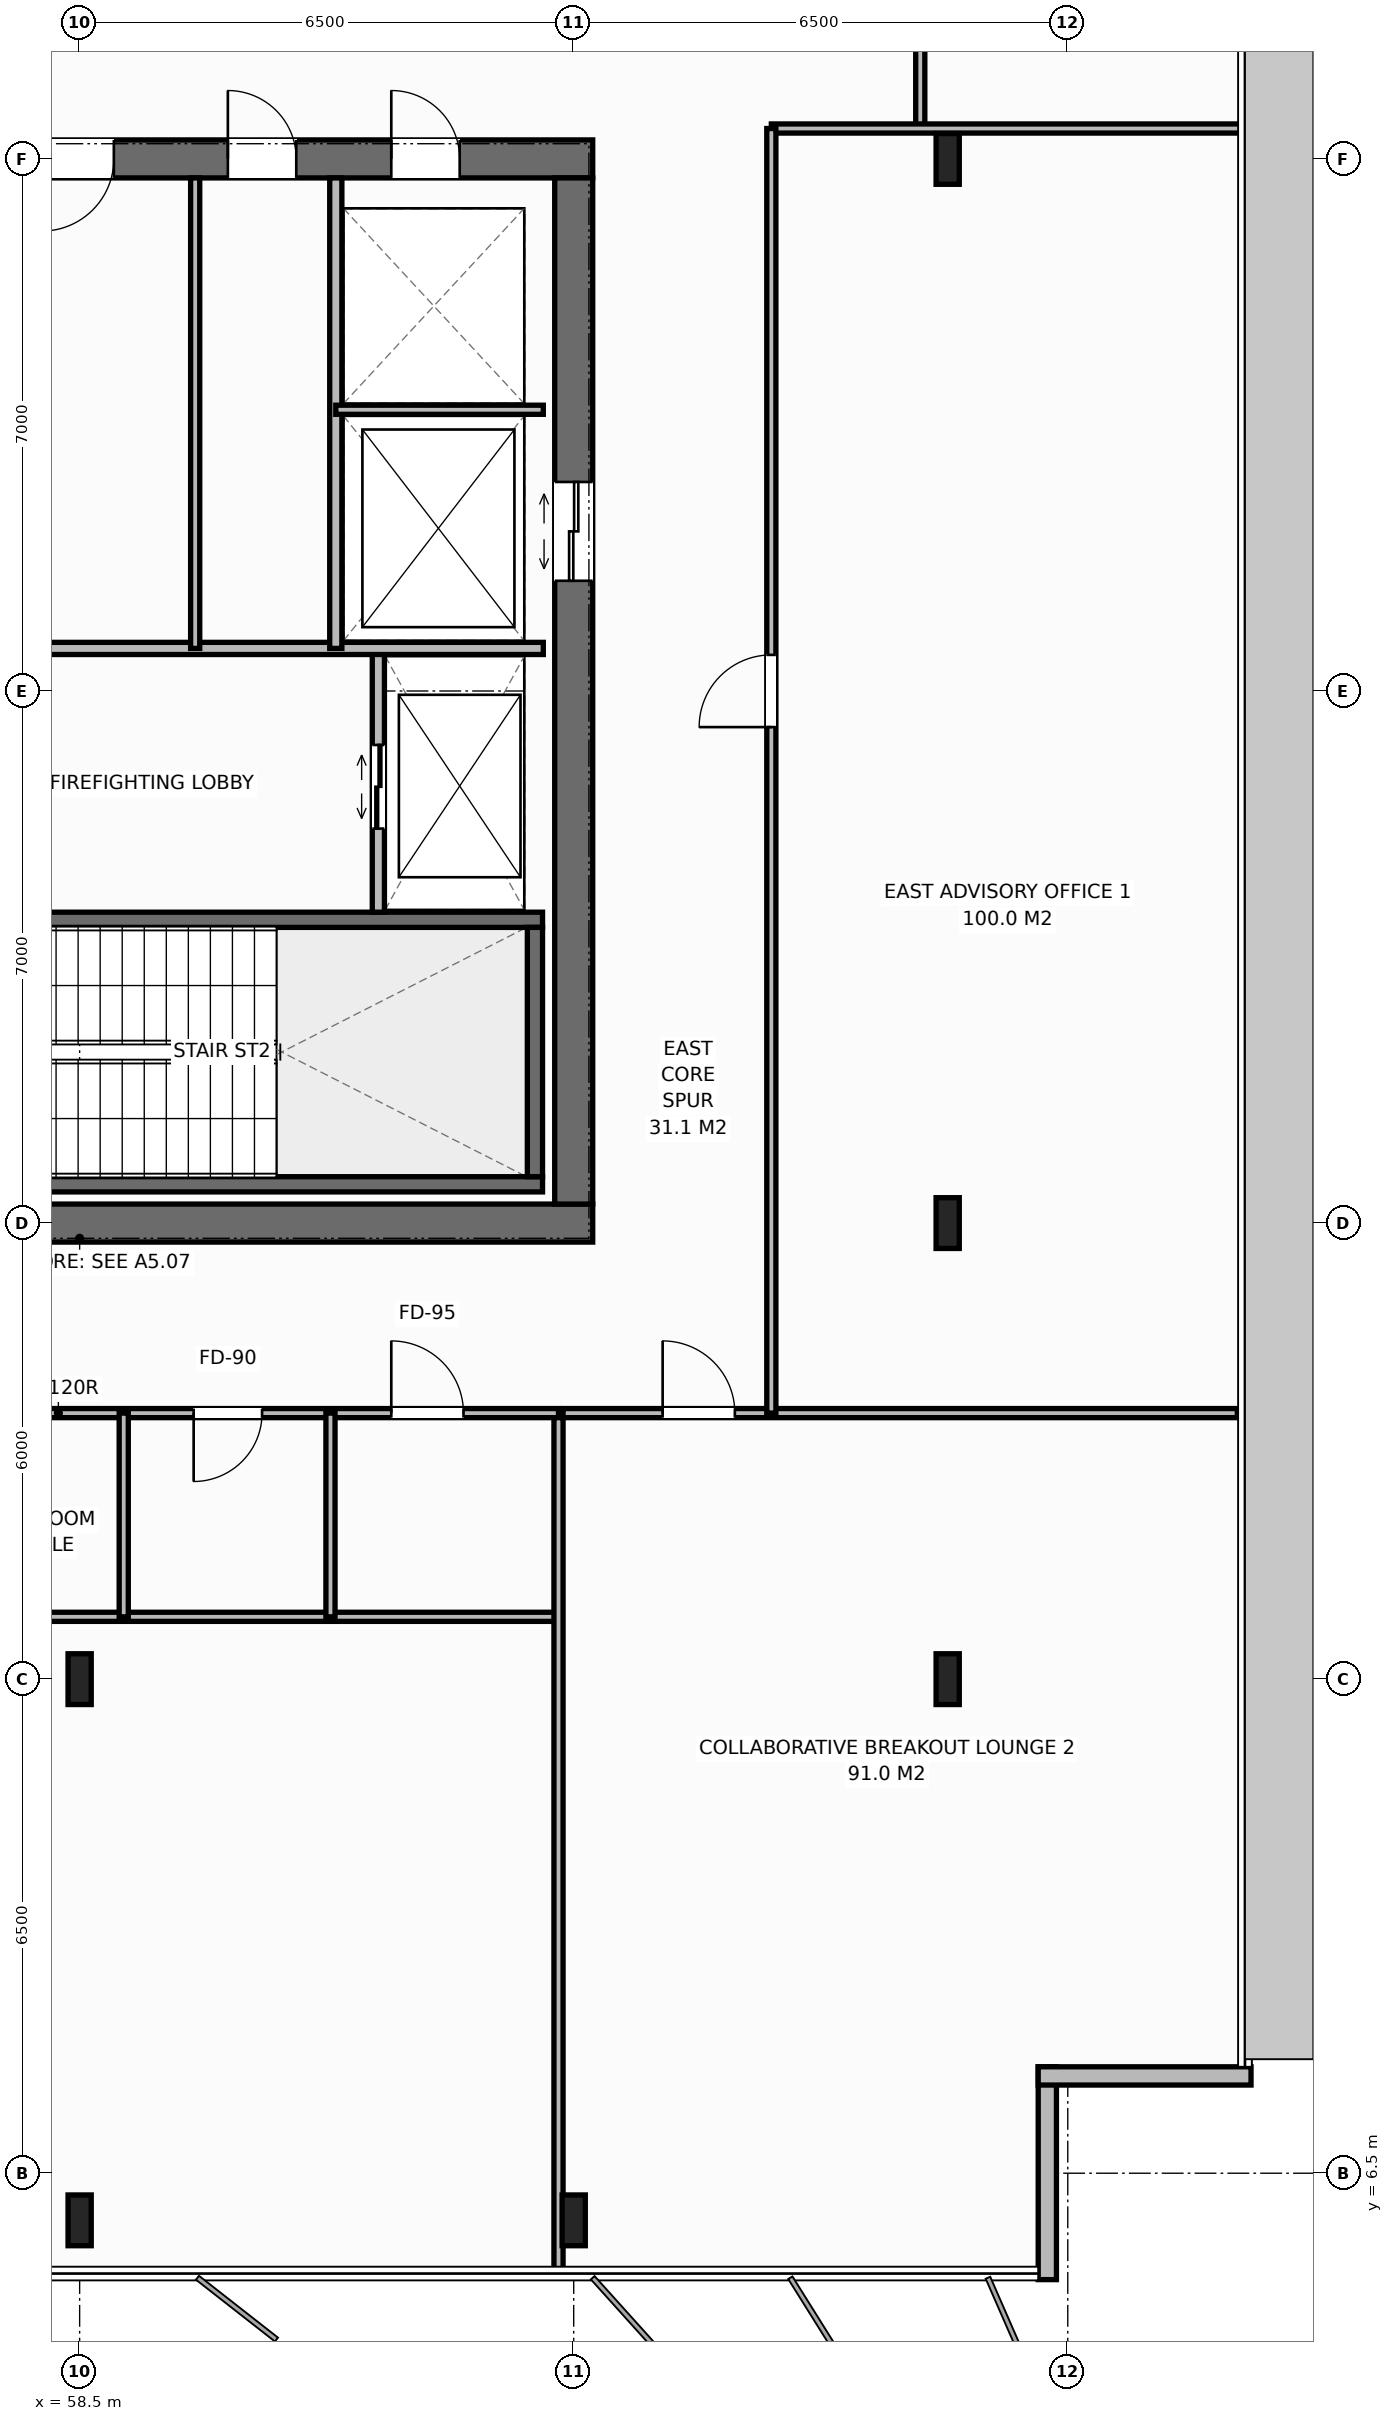
"""IFC4 building model, lengths in metres.
Left out: names, types, materials, properties, quantities, classifications, styles, units other than length and angle.
Written with IfcOpenShell. Run it as: python <this file> out.ifc"""

import sys

from ifc_helpers import new_model, si_unit, direction, frame, frame_2d, origin, origin_2d, place, context, subcontext, project, spatial, rectangle, i_section, extrude, element, fill, save


model = new_model("IFC4")
c1 = context("Model", 3, precision=1e-05, world=origin(), true_north=direction((0.0, 1.0)))
c2 = subcontext(c1, "Body", "Model", "MODEL_VIEW")
j1 = project(units=[si_unit("LENGTHUNIT", "METRE"), si_unit("PLANEANGLEUNIT", "RADIAN")], contexts=[c1])
p1 = place(None, origin())
s1 = spatial("IfcSite", under=j1, at=p1, CompositionType="ELEMENT")
p2 = place(p1, origin())
s2 = spatial("IfcBuilding", under=s1, at=p2, CompositionType="ELEMENT")
p3 = place(p2, frame((0.0, 0.0, 298.4)))
s3 = spatial("IfcBuildingStorey", under=s2, at=p3, CompositionType="ELEMENT", Elevation=298.4)
p4 = place(p3, frame((51.75, 19.0, 0.0), z_axis=(0.0, 0.0, 1.0), x_axis=(1.0, 0.0, 0.0)))
e1 = element("IfcWall", 1, at=p4, inside=s3, PredefinedType="SHEAR", context=c2, shape_type="SweptSolid", body=[
    extrude(rectangle(XDim=13.5, YDim=0.5, at=frame_2d((6.75, 0.0))), origin(), (0.0, 0.0, 1.0), 4.0),
])
p5 = place(p4, frame((2.97, 0.0, 0.0)))
e2 = element("IfcOpeningElement", 2, at=p5, cuts=e1, PredefinedType="OPENING", context=c2, shape_type="SweptSolid", body=[
    extrude(rectangle(XDim=1.4, YDim=2.2, at=frame_2d((0.7, 1.1))), frame((0.0, 0.26, 0.0), z_axis=(0.0, -1.0, 0.0), x_axis=(1.0, 0.0, 0.0)), (0.0, 0.0, 1.0), 0.52),
])
p6 = place(p3, frame((51.75, 33.0, 0.0), z_axis=(0.0, 0.0, 1.0), x_axis=(1.0, 0.0, 0.0)))
e3 = element("IfcWall", 3, at=p6, inside=s3, PredefinedType="SHEAR", context=c2, shape_type="SweptSolid", body=[
    extrude(rectangle(XDim=13.5, YDim=0.5, at=frame_2d((6.75, 0.0))), origin(), (0.0, 0.0, 1.0), 4.0),
])
p7 = place(p6, frame((2.97, 0.0, 0.0)))
e4 = element("IfcOpeningElement", 4, at=p7, cuts=e3, PredefinedType="OPENING", context=c2, shape_type="SweptSolid", body=[
    extrude(rectangle(XDim=1.4, YDim=2.2, at=frame_2d((0.7, 1.1))), frame((0.0, 0.26, 0.0), z_axis=(0.0, -1.0, 0.0), x_axis=(1.0, 0.0, 0.0)), (0.0, 0.0, 1.0), 0.52),
])
p8 = place(p6, frame((10.85, 0.0, 0.0)))
e5 = element("IfcOpeningElement", 5, at=p8, cuts=e3, PredefinedType="OPENING", context=c2, shape_type="SweptSolid", body=[
    extrude(rectangle(XDim=0.9, YDim=2.15, at=frame_2d((0.45, 1.075))), frame((0.0, 0.26, 0.0), z_axis=(0.0, -1.0, 0.0), x_axis=(1.0, 0.0, 0.0)), (0.0, 0.0, 1.0), 0.52),
])
p9 = place(p6, frame((6.25, 0.0, 0.0)))
e6 = element("IfcOpeningElement", 6, at=p9, cuts=e3, PredefinedType="OPENING", context=c2, shape_type="SweptSolid", body=[
    extrude(rectangle(XDim=0.95, YDim=2.15, at=frame_2d((0.475, 1.075))), frame((0.0, 0.26, 0.0), z_axis=(0.0, -1.0, 0.0), x_axis=(1.0, 0.0, 0.0)), (0.0, 0.0, 1.0), 0.52),
])
p10 = place(p6, frame((8.7, 0.0, 0.0)))
e7 = element("IfcOpeningElement", 7, at=p10, cuts=e3, PredefinedType="OPENING", context=c2, shape_type="SweptSolid", body=[
    extrude(rectangle(XDim=0.9, YDim=2.15, at=frame_2d((0.45, 1.075))), frame((0.0, 0.26, 0.0), z_axis=(0.0, -1.0, 0.0), x_axis=(1.0, 0.0, 0.0)), (0.0, 0.0, 1.0), 0.52),
])
p11 = place(p3, frame((65.0, 19.25, 0.0), z_axis=(0.0, 0.0, 1.0), x_axis=(0.0, 1.0, 0.0)))
e8 = element("IfcWall", 8, at=p11, inside=s3, PredefinedType="SHEAR", context=c2, shape_type="SweptSolid", body=[
    extrude(rectangle(XDim=13.5, YDim=0.5, at=frame_2d((6.75, 0.0))), origin(), (0.0, 0.0, 1.0), 4.0),
])
p12 = place(p11, frame((8.2, 0.0, 0.0)))
e9 = element("IfcOpeningElement", 9, at=p12, cuts=e8, PredefinedType="OPENING", context=c2, shape_type="SweptSolid", body=[
    extrude(rectangle(XDim=1.3, YDim=2.2, at=frame_2d((0.65, 1.1))), frame((0.0, 0.26, 0.0), z_axis=(0.0, -1.0, 0.0), x_axis=(1.0, 0.0, 0.0)), (0.0, 0.0, 1.0), 0.52),
])
p13 = place(p3, frame((56.16, 19.51, 0.0), z_axis=(0.0, 0.0, 1.0), x_axis=(1.0, 0.0, 0.0)))
e10 = element("IfcWall", 10, at=p13, inside=s3, PredefinedType="SHEAR", context=c2, shape_type="SweptSolid", body=[
    extrude(rectangle(XDim=8.43, YDim=0.2, at=frame_2d((4.215, 0.0))), origin(), (0.0, 0.0, 1.0), 4.0),
])
p14 = place(p3, frame((56.16, 22.99, 0.0), z_axis=(0.0, 0.0, 1.0), x_axis=(1.0, 0.0, 0.0)))
e11 = element("IfcWall", 11, at=p14, inside=s3, PredefinedType="SHEAR", context=c2, shape_type="SweptSolid", body=[
    extrude(rectangle(XDim=8.43, YDim=0.2, at=frame_2d((4.215, 0.0))), origin(), (0.0, 0.0, 1.0), 4.0),
])
p15 = place(p14, frame((0.45, 0.0, 0.0)))
e12 = element("IfcOpeningElement", 12, at=p15, cuts=e11, PredefinedType="OPENING", context=c2, shape_type="SweptSolid", body=[
    extrude(rectangle(XDim=1.0, YDim=2.15, at=frame_2d((0.5, 1.075))), frame((0.0, 0.11, 0.0), z_axis=(0.0, -1.0, 0.0), x_axis=(1.0, 0.0, 0.0)), (0.0, 0.0, 1.0), 0.22),
])
p16 = place(p3, frame((64.49, 19.61, 0.0), z_axis=(0.0, 0.0, 1.0), x_axis=(0.0, 1.0, 0.0)))
e13 = element("IfcWall", 13, at=p16, inside=s3, PredefinedType="SHEAR", context=c2, shape_type="SweptSolid", body=[
    extrude(rectangle(XDim=3.28, YDim=0.2, at=frame_2d((1.64, 0.0))), origin(), (0.0, 0.0, 1.0), 4.0),
])
for number, where, z_axis, x_axis in (
    (14, (58.5, 13.0, 0.0), (0.0, 0.0, 1.0), (1.0, 0.0, 0.0)),
    (15, (58.5, 5.88, 0.0), (0.0, 0.0, 1.0), (1.0, 0.0, 0.0)),
    (16, (65.0, 5.88, 0.0), (0.0, 0.0, 1.0), (1.0, 0.0, 0.0)),
    (17, (69.92, 13.0, 0.0), (0.0, 0.0, 1.0), (1.0, 0.0, 0.0)),
    (18, (69.92, 19.0, 0.0), (0.0, 0.0, 1.0), (1.0, 0.0, 0.0)),
    (19, (69.92, 33.0, 0.0), (0.0, 0.0, 1.0), (1.0, 0.0, 0.0)),
):
    element("IfcColumn", number, at=place(p3, frame(where, z_axis=z_axis, x_axis=x_axis)), inside=s3, PredefinedType="COLUMN", context=c2, shape_type="SweptSolid", body=[
        extrude(i_section(OverallWidth=0.305, OverallDepth=0.668, WebThickness=0.021, FlangeThickness=0.04, at=origin_2d()), origin(), (0.0, 0.0, 1.0), 4.0),
    ])
for number, where, z_axis, x_axis in (
    (20, (71.231, 7.9, 0.0), (0.0, 0.0, 1.0), (0.0, -1.0, 0.0)),
    (21, (73.911, 7.78, 0.0), (0.0, 0.0, 1.0), (-1.0, 0.0, 0.0)),
):
    element("IfcWall", number, at=place(p3, frame(where, z_axis=z_axis, x_axis=x_axis)), inside=s3, PredefinedType="STANDARD", context=c2, shape_type="SweptSolid", body=[
        extrude(rectangle(XDim=2.8, YDim=0.24, at=frame_2d((1.4, 0.0))), origin(), (0.0, 0.0, 1.0), 3.788),
    ])
p17 = place(p3, frame((62.43, 23.09, 0.0), z_axis=(0.0, 0.0, 1.0), x_axis=(0.0, 1.0, 0.0)))
e22 = element("IfcWall", 22, at=p17, inside=s3, PredefinedType="STANDARD", context=c2, shape_type="SweptSolid", body=[
    extrude(rectangle(XDim=3.47, YDim=0.16, at=frame_2d((1.735, 0.0))), origin(), (0.0, 0.0, 1.0), 3.788),
])
p18 = place(p17, frame((1.1, 0.0, 0.0)))
e23 = element("IfcOpeningElement", 23, at=p18, cuts=e22, PredefinedType="OPENING", context=c2, shape_type="SweptSolid", body=[
    extrude(rectangle(XDim=1.1, YDim=2.2, at=frame_2d((0.55, 1.1))), frame((0.0, 0.09, 0.0), z_axis=(0.0, -1.0, 0.0), x_axis=(1.0, 0.0, 0.0)), (0.0, 0.0, 1.0), 0.18),
])
p19 = place(p3, frame((56.26, 26.56, 0.0), z_axis=(0.0, 0.0, 1.0), x_axis=(1.0, 0.0, 0.0)))
e24 = element("IfcWall", 24, at=p19, inside=s3, PredefinedType="STANDARD", context=c2, shape_type="SweptSolid", body=[
    extrude(rectangle(XDim=8.34, YDim=0.16, at=frame_2d((4.17, 0.0))), origin(), (0.0, 0.0, 1.0), 3.788),
])
p20 = place(p3, frame((61.87, 26.56, 0.0), z_axis=(0.0, 0.0, 1.0), x_axis=(0.0, 1.0, 0.0)))
e25 = element("IfcWall", 25, at=p20, inside=s3, PredefinedType="STANDARD", context=c2, shape_type="SweptSolid", body=[
    extrude(rectangle(XDim=6.19, YDim=0.16, at=frame_2d((3.095, 0.0))), origin(), (0.0, 0.0, 1.0), 3.788),
])
p21 = place(p3, frame((61.87, 29.7, 0.0), z_axis=(0.0, 0.0, 1.0), x_axis=(1.0, 0.0, 0.0)))
e26 = element("IfcWall", 26, at=p21, inside=s3, PredefinedType="PARTITIONING", context=c2, shape_type="SweptSolid", body=[
    extrude(rectangle(XDim=2.73, YDim=0.12, at=frame_2d((1.365, 0.0))), origin(), (0.0, 0.0, 1.0), 3.788),
])
p22 = place(p3, frame((60.02, 26.56, 0.0), z_axis=(0.0, 0.0, 1.0), x_axis=(0.0, 1.0, 0.0)))
e27 = element("IfcWall", 27, at=p22, inside=s3, PredefinedType="PARTITIONING", context=c2, shape_type="SweptSolid", body=[
    extrude(rectangle(XDim=6.19, YDim=0.12, at=frame_2d((3.095, 0.0))), origin(), (0.0, 0.0, 1.0), 3.788),
])
p23 = place(p3, frame((69.559, 33.4, 0.0), z_axis=(0.0, 0.0, 1.0), x_axis=(0.0, 1.0, 0.0)))
e28 = element("IfcWall", 28, at=p23, inside=s3, PredefinedType="PARTITIONING", context=c2, shape_type="SweptSolid", body=[
    extrude(rectangle(XDim=2.1, YDim=0.12, at=frame_2d((1.05, 0.0))), origin(), (0.0, 0.0, 1.0), 3.788),
])
p24 = place(p3, frame((51.64, 16.5, 0.0), z_axis=(0.0, 0.0, 1.0), x_axis=(1.0, 0.0, 0.0)))
e29 = element("IfcWall", 29, at=p24, inside=s3, PredefinedType="PARTITIONING", context=c2, shape_type="SweptSolid", body=[
    extrude(rectangle(XDim=13.16, YDim=0.12, at=frame_2d((6.58, 0.0))), origin(), (0.0, 0.0, 1.0), 3.788),
])
p25 = place(p24, frame((1.51, 0.0, 0.0)))
e30 = element("IfcOpeningElement", 30, at=p25, cuts=e29, PredefinedType="OPENING", context=c2, shape_type="SweptSolid", body=[
    extrude(rectangle(XDim=0.9, YDim=2.15, at=frame_2d((0.45, 1.075))), frame((0.0, 0.07, 0.0), z_axis=(0.0, -1.0, 0.0), x_axis=(1.0, 0.0, 0.0)), (0.0, 0.0, 1.0), 0.14),
])
p26 = place(p24, frame((4.51, 0.0, 0.0)))
e31 = element("IfcOpeningElement", 31, at=p26, cuts=e29, PredefinedType="OPENING", context=c2, shape_type="SweptSolid", body=[
    extrude(rectangle(XDim=0.9, YDim=2.15, at=frame_2d((0.45, 1.075))), frame((0.0, 0.07, 0.0), z_axis=(0.0, -1.0, 0.0), x_axis=(1.0, 0.0, 0.0)), (0.0, 0.0, 1.0), 0.14),
])
p27 = place(p24, frame((8.36, 0.0, 0.0)))
e32 = element("IfcOpeningElement", 32, at=p27, cuts=e29, PredefinedType="OPENING", context=c2, shape_type="SweptSolid", body=[
    extrude(rectangle(XDim=0.9, YDim=2.15, at=frame_2d((0.45, 1.075))), frame((0.0, 0.07, 0.0), z_axis=(0.0, -1.0, 0.0), x_axis=(1.0, 0.0, 0.0)), (0.0, 0.0, 1.0), 0.14),
])
p28 = place(p24, frame((10.96, 0.0, 0.0)))
e33 = element("IfcOpeningElement", 33, at=p28, cuts=e29, PredefinedType="OPENING", context=c2, shape_type="SweptSolid", body=[
    extrude(rectangle(XDim=0.95, YDim=2.15, at=frame_2d((0.475, 1.075))), frame((0.0, 0.07, 0.0), z_axis=(0.0, -1.0, 0.0), x_axis=(1.0, 0.0, 0.0)), (0.0, 0.0, 1.0), 0.14),
])
p29 = place(p3, frame((51.64, 13.82, 0.0), z_axis=(0.0, 0.0, 1.0), x_axis=(1.0, 0.0, 0.0)))
e34 = element("IfcWall", 34, at=p29, inside=s3, PredefinedType="PARTITIONING", context=c2, shape_type="SweptSolid", body=[
    extrude(rectangle(XDim=13.16, YDim=0.12, at=frame_2d((6.58, 0.0))), origin(), (0.0, 0.0, 1.0), 3.788),
])
for number, where, z_axis, x_axis in (
    (35, (59.08, 13.82, 0.0), (0.0, 0.0, 1.0), (0.0, 1.0, 0.0)),
    (36, (61.8, 13.82, 0.0), (0.0, 0.0, 1.0), (0.0, 1.0, 0.0)),
):
    element("IfcWall", number, at=place(p3, frame(where, z_axis=z_axis, x_axis=x_axis)), inside=s3, PredefinedType="PARTITIONING", context=c2, shape_type="SweptSolid", body=[
        extrude(rectangle(XDim=2.68, YDim=0.12, at=frame_2d((1.34, 0.0))), origin(), (0.0, 0.0, 1.0), 3.788),
    ])
p30 = place(p3, frame((64.8, 5.12, 0.0), z_axis=(0.0, 0.0, 1.0), x_axis=(0.0, 1.0, 0.0)))
e37 = element("IfcWall", 37, at=p30, inside=s3, PredefinedType="PARTITIONING", context=c2, shape_type="SweptSolid", body=[
    extrude(rectangle(XDim=11.32, YDim=0.12, at=frame_2d((5.66, 0.0))), origin(), (0.0, 0.0, 1.0), 2.988),
])
p31 = place(p3, frame((64.86, 16.5, 0.0), z_axis=(0.0, 0.0, 1.0), x_axis=(1.0, 0.0, 0.0)))
e38 = element("IfcWall", 38, at=p31, inside=s3, PredefinedType="PARTITIONING", context=c2, shape_type="SweptSolid", body=[
    extrude(rectangle(XDim=8.871, YDim=0.12, at=frame_2d((4.436, 0.0))), origin(), (0.0, 0.0, 1.0), 3.788),
])
p32 = place(p31, frame((1.31, 0.0, 0.0)))
e39 = element("IfcOpeningElement", 39, at=p32, cuts=e38, PredefinedType="OPENING", context=c2, shape_type="SweptSolid", body=[
    extrude(rectangle(XDim=0.95, YDim=2.15, at=frame_2d((0.475, 1.075))), frame((0.0, 0.07, 0.0), z_axis=(0.0, -1.0, 0.0), x_axis=(1.0, 0.0, 0.0)), (0.0, 0.0, 1.0), 0.14),
])
p33 = place(p3, frame((67.6, 33.4, 0.0), z_axis=(0.0, 0.0, 1.0), x_axis=(1.0, 0.0, 0.0)))
e40 = element("IfcWall", 40, at=p33, inside=s3, PredefinedType="PARTITIONING", context=c2, shape_type="SweptSolid", body=[
    extrude(rectangle(XDim=6.291, YDim=0.12, at=frame_2d((3.146, 0.0))), origin(), (0.0, 0.0, 1.0), 3.788),
])
p34 = place(p3, frame((67.6, 16.5, 0.0), z_axis=(0.0, 0.0, 1.0), x_axis=(0.0, 1.0, 0.0)))
e41 = element("IfcWall", 41, at=p34, inside=s3, PredefinedType="PARTITIONING", context=c2, shape_type="SweptSolid", body=[
    extrude(rectangle(XDim=16.9, YDim=0.12, at=frame_2d((8.45, 0.0))), origin(), (0.0, 0.0, 1.0), 3.788),
])
p35 = place(p34, frame((9.025, 0.0, 0.0)))
e42 = element("IfcOpeningElement", 42, at=p35, cuts=e41, PredefinedType="OPENING", context=c2, shape_type="SweptSolid", body=[
    extrude(rectangle(XDim=0.95, YDim=2.15, at=frame_2d((0.475, 1.075))), frame((0.0, 0.07, 0.0), z_axis=(0.0, -1.0, 0.0), x_axis=(1.0, 0.0, 0.0)), (0.0, 0.0, 1.0), 0.14),
])
p36 = place(p18, origin())
e43 = element("IfcDoor", 43, at=p36, inside=s3, OperationType="DOUBLE_DOOR_SLIDING", PredefinedType="DOOR", context=c2, shape_type="SweptSolid", body=[
    extrude(rectangle(XDim=1.1, YDim=2.2, at=frame_2d((0.55, 1.1))), frame((0.0, 0.025, 0.0), z_axis=(0.0, -1.0, 0.0), x_axis=(1.0, 0.0, 0.0)), (0.0, 0.0, 1.0), 0.05),
])
fill(e23, e43)
p37 = place(p12, origin())
e44 = element("IfcDoor", 44, at=p37, inside=s3, OperationType="DOUBLE_DOOR_SLIDING", PredefinedType="DOOR", context=c2, shape_type="SweptSolid", body=[
    extrude(rectangle(XDim=1.3, YDim=2.2, at=frame_2d((0.65, 1.1))), frame((0.0, 0.025, 0.0), z_axis=(0.0, -1.0, 0.0), x_axis=(1.0, 0.0, 0.0)), (0.0, 0.0, 1.0), 0.05),
])
fill(e9, e44)
p38 = place(p8, origin())
e45 = element("IfcDoor", 45, at=p38, inside=s3, OperationType="SINGLE_SWING_LEFT", PredefinedType="DOOR", context=c2, shape_type="SweptSolid", body=[
    extrude(rectangle(XDim=0.9, YDim=2.15, at=frame_2d((0.45, 1.075))), frame((0.0, -0.025, 0.0), z_axis=(0.0, -1.0, 0.0), x_axis=(1.0, 0.0, 0.0)), (0.0, 0.0, 1.0), 0.05),
])
fill(e5, e45)
p39 = place(p9, origin())
e46 = element("IfcDoor", 46, at=p39, inside=s3, OperationType="SINGLE_SWING_RIGHT", PredefinedType="DOOR", context=c2, shape_type="SweptSolid", body=[
    extrude(rectangle(XDim=0.95, YDim=2.15, at=frame_2d((0.475, 1.075))), frame((0.0, -0.025, 0.0), z_axis=(0.0, -1.0, 0.0), x_axis=(1.0, 0.0, 0.0)), (0.0, 0.0, 1.0), 0.05),
])
fill(e6, e46)
p40 = place(p10, origin())
e47 = element("IfcDoor", 47, at=p40, inside=s3, OperationType="SINGLE_SWING_LEFT", PredefinedType="DOOR", context=c2, shape_type="SweptSolid", body=[
    extrude(rectangle(XDim=0.9, YDim=2.15, at=frame_2d((0.45, 1.075))), frame((0.0, -0.025, 0.0), z_axis=(0.0, -1.0, 0.0), x_axis=(1.0, 0.0, 0.0)), (0.0, 0.0, 1.0), 0.05),
])
fill(e7, e47)
p41 = place(p27, origin())
e48 = element("IfcDoor", 48, at=p41, inside=s3, OperationType="SINGLE_SWING_RIGHT", PredefinedType="DOOR", context=c2, shape_type="SweptSolid", body=[
    extrude(rectangle(XDim=0.9, YDim=2.15, at=frame_2d((0.45, 1.075))), frame((0.0, 0.025, 0.0), z_axis=(0.0, -1.0, 0.0), x_axis=(1.0, 0.0, 0.0)), (0.0, 0.0, 1.0), 0.05),
])
fill(e32, e48)
p42 = place(p28, origin())
e49 = element("IfcDoor", 49, at=p42, inside=s3, OperationType="SINGLE_SWING_LEFT", PredefinedType="DOOR", context=c2, shape_type="SweptSolid", body=[
    extrude(rectangle(XDim=0.95, YDim=2.15, at=frame_2d((0.475, 1.075))), frame((0.0, 0.025, 0.0), z_axis=(0.0, -1.0, 0.0), x_axis=(1.0, 0.0, 0.0)), (0.0, 0.0, 1.0), 0.05),
])
fill(e33, e49)
p43 = place(p32, origin())
e50 = element("IfcDoor", 50, at=p43, inside=s3, OperationType="SINGLE_SWING_LEFT", PredefinedType="DOOR", context=c2, shape_type="SweptSolid", body=[
    extrude(rectangle(XDim=0.95, YDim=2.15, at=frame_2d((0.475, 1.075))), frame((0.0, 0.025, 0.0), z_axis=(0.0, -1.0, 0.0), x_axis=(1.0, 0.0, 0.0)), (0.0, 0.0, 1.0), 0.05),
])
fill(e39, e50)
p44 = place(p35, origin())
e51 = element("IfcDoor", 51, at=p44, inside=s3, OperationType="SINGLE_SWING_LEFT", PredefinedType="DOOR", context=c2, shape_type="SweptSolid", body=[
    extrude(rectangle(XDim=0.95, YDim=2.15, at=frame_2d((0.475, 1.075))), frame((0.0, 0.025, 0.0), z_axis=(0.0, -1.0, 0.0), x_axis=(1.0, 0.0, 0.0)), (0.0, 0.0, 1.0), 0.05),
])
fill(e42, e51)
save(model, sys.argv[1])
